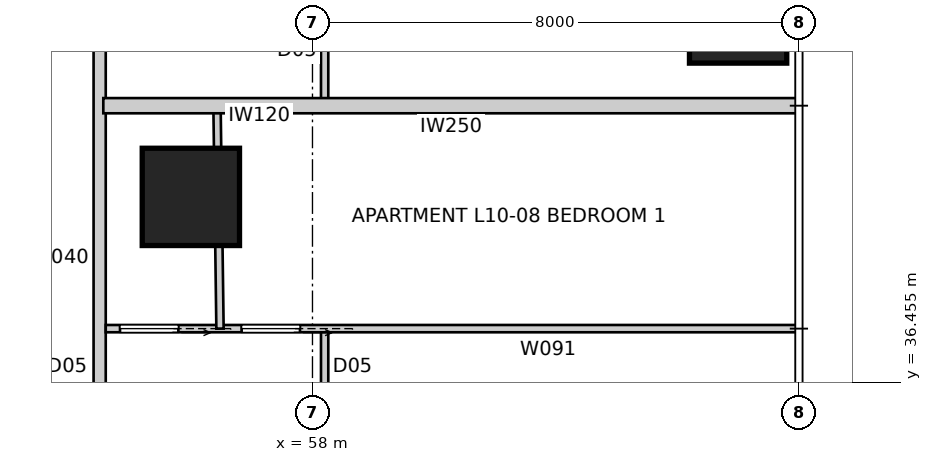
"""IFC4 building model, lengths in metres.
Left out: names, types, materials, properties, quantities, classifications, styles, units other than length and angle.
Written with IfcOpenShell. Run it as: python <this file> out.ifc"""

import sys

from ifc_helpers import new_model, si_unit, direction, frame, frame_2d, origin, origin_2d, place, context, subcontext, project, spatial, rectangle, extrude, element, fill, save


model = new_model("IFC4")
c1 = context("Model", 3, precision=1e-05, world=origin(), true_north=direction((0.0, 1.0)))
c2 = subcontext(c1, "Body", "Model", "MODEL_VIEW")
j1 = project(units=[si_unit("LENGTHUNIT", "METRE"), si_unit("PLANEANGLEUNIT", "RADIAN")], contexts=[c1])
p1 = place(None, origin())
s1 = spatial("IfcSite", under=j1, at=p1, CompositionType="ELEMENT")
p2 = place(p1, origin())
s2 = spatial("IfcBuilding", under=s1, at=p2, CompositionType="ELEMENT")
p3 = place(p2, frame((0.0, 0.0, 38.8)))
s3 = spatial("IfcBuildingStorey", under=s2, at=p3, CompositionType="ELEMENT", Elevation=38.8)
p4 = place(p3, frame((65.0, 42.5, 0.0), z_axis=(0.0, 0.0, 1.0), x_axis=(1.0, 0.0, 0.0)))
e1 = element("IfcColumn", 1, at=p4, inside=s3, PredefinedType="COLUMN", context=c2, shape_type="SweptSolid", body=[
    extrude(rectangle(XDim=1.6, YDim=1.6, at=origin_2d()), origin(), (0.0, 0.0, 1.0), 3.2),
])
p5 = place(p3, frame((56.0, 39.5, 0.0), z_axis=(0.0, 0.0, 1.0), x_axis=(1.0, 0.0, 0.0)))
e2 = element("IfcColumn", 2, at=p5, inside=s3, PredefinedType="COLUMN", context=c2, shape_type="SweptSolid", body=[
    extrude(rectangle(XDim=1.6, YDim=1.6, at=origin_2d()), origin(), (0.0, 0.0, 1.0), 3.4),
])
p6 = place(p3, frame((54.5, 16.3, 0.0), z_axis=(0.0, 0.0, 1.0), x_axis=(0.0, 1.0, 0.0)))
e3 = element("IfcWall", 3, at=p6, inside=s3, PredefinedType="PARTITIONING", context=c2, shape_type="SweptSolid", body=[
    extrude(rectangle(XDim=28.2, YDim=0.2, at=frame_2d((14.1, 0.0))), origin(), (0.0, 0.0, 1.0), 3.2),
])
p7 = place(p6, frame((7.277, 0.0, 0.0)))
e4 = element("IfcOpeningElement", 4, at=p7, cuts=e3, PredefinedType="OPENING", context=c2, shape_type="SweptSolid", body=[
    extrude(rectangle(XDim=1.02, YDim=2.34, at=frame_2d((0.51, 1.17))), frame((0.0, 0.11, 0.0), z_axis=(0.0, -1.0, 0.0), x_axis=(1.0, 0.0, 0.0)), (0.0, 0.0, 1.0), 0.22),
])
p8 = place(p6, frame((15.16, 0.0, 0.0)))
e5 = element("IfcOpeningElement", 5, at=p8, cuts=e3, PredefinedType="OPENING", context=c2, shape_type="SweptSolid", body=[
    extrude(rectangle(XDim=1.02, YDim=2.34, at=frame_2d((0.51, 1.17))), frame((0.0, 0.11, 0.0), z_axis=(0.0, -1.0, 0.0), x_axis=(1.0, 0.0, 0.0)), (0.0, 0.0, 1.0), 0.22),
])
p9 = place(p3, frame((66.0, 41.0, 0.0), z_axis=(0.0, 0.0, 1.0), x_axis=(-1.0, 0.0, 0.0)))
e6 = element("IfcWall", 6, at=p9, inside=s3, PredefinedType="PARTITIONING", context=c2, shape_type="SweptSolid", body=[
    extrude(rectangle(XDim=11.44, YDim=0.25, at=frame_2d((5.72, 0.0))), origin(), (0.0, 0.0, 1.0), 3.2),
])
p10 = place(p3, frame((58.2, 37.333, 0.0), z_axis=(0.0, 0.0, 1.0), x_axis=(0.0, -1.0, 0.0)))
e7 = element("IfcWall", 7, at=p10, inside=s3, PredefinedType="PARTITIONING", context=c2, shape_type="SweptSolid", body=[
    extrude(rectangle(XDim=11.0, YDim=0.12, at=frame_2d((5.5, 0.0))), origin(), (0.0, 0.0, 1.0), 3.2),
])
p11 = place(p10, frame((5.015, 0.0, 0.0)))
e8 = element("IfcOpeningElement", 8, at=p11, cuts=e7, PredefinedType="OPENING", context=c2, shape_type="SweptSolid", body=[
    extrude(rectangle(XDim=0.92, YDim=2.34, at=frame_2d((0.46, 1.17))), frame((0.0, 0.07, 0.0), z_axis=(0.0, -1.0, 0.0), x_axis=(1.0, 0.0, 0.0)), (0.0, 0.0, 1.0), 0.14),
])
p12 = place(p10, frame((8.687, 0.0, 0.0)))
e9 = element("IfcOpeningElement", 9, at=p12, cuts=e7, PredefinedType="OPENING", context=c2, shape_type="SweptSolid", body=[
    extrude(rectangle(XDim=0.96, YDim=2.1, at=frame_2d((0.48, 1.05))), frame((0.0, 0.07, 0.0), z_axis=(0.0, -1.0, 0.0), x_axis=(1.0, 0.0, 0.0)), (0.0, 0.0, 1.0), 0.14),
])
p13 = place(p3, frame((65.96, 37.333, 0.0), z_axis=(0.0, 0.0, 1.0), x_axis=(-1.0, 0.0, 0.0)))
e10 = element("IfcWall", 10, at=p13, inside=s3, PredefinedType="PARTITIONING", context=c2, shape_type="SweptSolid", body=[
    extrude(rectangle(XDim=11.36, YDim=0.12, at=frame_2d((5.68, 0.0))), origin(), (0.0, 0.0, 1.0), 3.2),
])
p14 = place(p13, frame((8.166, 0.0, 0.0)))
e11 = element("IfcOpeningElement", 11, at=p14, cuts=e10, PredefinedType="OPENING", context=c2, shape_type="SweptSolid", body=[
    extrude(rectangle(XDim=0.96, YDim=2.1, at=frame_2d((0.48, 1.05))), frame((0.0, 0.07, 0.0), z_axis=(0.0, -1.0, 0.0), x_axis=(1.0, 0.0, 0.0)), (0.0, 0.0, 1.0), 0.14),
])
p15 = place(p13, frame((10.166, 0.0, 0.0)))
e12 = element("IfcOpeningElement", 12, at=p15, cuts=e10, PredefinedType="OPENING", context=c2, shape_type="SweptSolid", body=[
    extrude(rectangle(XDim=0.96, YDim=2.1, at=frame_2d((0.48, 1.05))), frame((0.0, 0.07, 0.0), z_axis=(0.0, -1.0, 0.0), x_axis=(1.0, 0.0, 0.0)), (0.0, 0.0, 1.0), 0.14),
])
p16 = place(p3, frame((56.43, 41.0, 0.0), z_axis=(0.0, 0.0, 1.0), x_axis=(0.013381849808, -0.999910459039, 0.0)))
e13 = element("IfcWall", 13, at=p16, inside=s3, PredefinedType="PARTITIONING", context=c2, shape_type="SweptSolid", body=[
    extrude(rectangle(XDim=3.667, YDim=0.12, at=frame_2d((1.833, 0.0))), origin(), (0.0, 0.0, 1.0), 2.2),
])
p17 = place(p3, frame((58.2, 48.2, 0.0), z_axis=(0.0, 0.0, 1.0), x_axis=(0.0, -1.0, 0.0)))
e14 = element("IfcWall", 14, at=p17, inside=s3, PredefinedType="PARTITIONING", context=c2, shape_type="SweptSolid", body=[
    extrude(rectangle(XDim=7.2, YDim=0.12, at=frame_2d((3.6, 0.0))), origin(), (0.0, 0.0, 1.0), 3.2),
])
p18 = place(p17, frame((2.377, 0.0, 0.0)))
e15 = element("IfcOpeningElement", 15, at=p18, cuts=e14, PredefinedType="OPENING", context=c2, shape_type="SweptSolid", body=[
    extrude(rectangle(XDim=0.92, YDim=2.34, at=frame_2d((0.46, 1.17))), frame((0.0, 0.07, 0.0), z_axis=(0.0, -1.0, 0.0), x_axis=(1.0, 0.0, 0.0)), (0.0, 0.0, 1.0), 0.14),
])
p19 = place(p14, origin())
e16 = element("IfcDoor", 16, at=p19, inside=s3, OperationType="SLIDING_TO_LEFT", PredefinedType="DOOR", context=c2, shape_type="SweptSolid", body=[
    extrude(rectangle(XDim=0.96, YDim=2.1, at=frame_2d((0.48, 1.05))), frame((0.0, 0.025, 0.0), z_axis=(0.0, -1.0, 0.0), x_axis=(1.0, 0.0, 0.0)), (0.0, 0.0, 1.0), 0.05),
])
fill(e11, e16)
p20 = place(p15, origin())
e17 = element("IfcDoor", 17, at=p20, inside=s3, OperationType="SLIDING_TO_LEFT", PredefinedType="DOOR", context=c2, shape_type="SweptSolid", body=[
    extrude(rectangle(XDim=0.96, YDim=2.1, at=frame_2d((0.48, 1.05))), frame((0.0, 0.025, 0.0), z_axis=(0.0, -1.0, 0.0), x_axis=(1.0, 0.0, 0.0)), (0.0, 0.0, 1.0), 0.05),
])
fill(e12, e17)
save(model, sys.argv[1])
